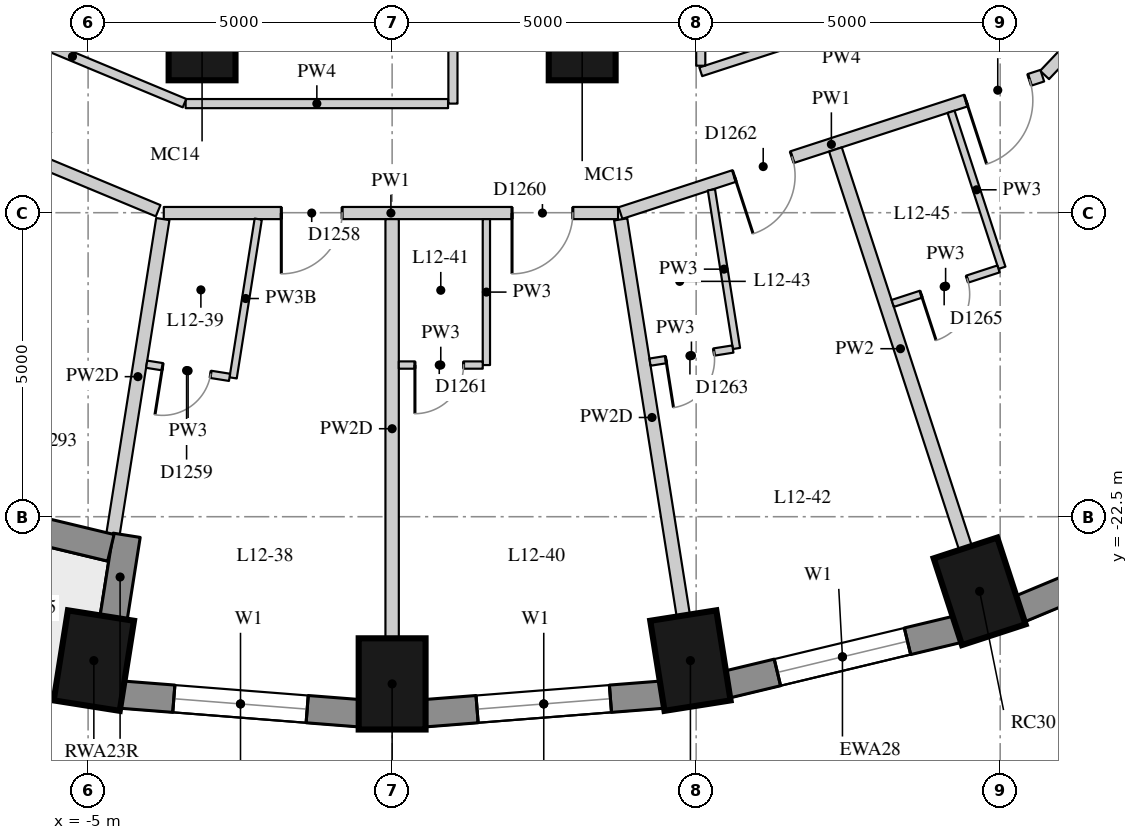
"""IFC4 building model, lengths in metres.
Left out: names, types, materials, properties, quantities, classifications, styles, units other than length and angle.
Written with IfcOpenShell. Run it as: python <this file> out.ifc"""

import sys

from ifc_helpers import new_model, si_unit, direction, frame, frame_2d, origin, origin_2d, place, context, subcontext, project, spatial, rectangle, extrude, element, fill, save


model = new_model("IFC4")
c1 = context("Model", 3, precision=1e-05, world=origin(), true_north=direction((0.0, 1.0)))
c2 = subcontext(c1, "Body", "Model", "MODEL_VIEW")
j1 = project(units=[si_unit("LENGTHUNIT", "METRE"), si_unit("PLANEANGLEUNIT", "RADIAN")], contexts=[c1])
p1 = place(None, origin())
s1 = spatial("IfcSite", under=j1, at=p1, CompositionType="ELEMENT")
p2 = place(p1, origin())
s2 = spatial("IfcBuilding", under=s1, at=p2, CompositionType="ELEMENT")
p3 = place(p2, frame((0.0, 0.0, 48.1)))
s3 = spatial("IfcBuildingStorey", under=s2, at=p3, CompositionType="ELEMENT", Elevation=48.1)
for number, where, z_axis, x_axis in (
    (1, (-4.906, -24.866, 0.0), (0.0, 0.0, 1.0), (-0.156, -0.988, 0.0)),
    (2, (0.0, -25.25, 0.0), (0.0, 0.0, 1.0), (0.0, -1.0, 0.0)),
    (3, (4.906, -24.866, 0.0), (0.0, 0.0, 1.0), (0.156, -0.988, 0.0)),
    (4, (9.662, -23.727, 0.0), (0.0, 0.0, 1.0), (0.31, -0.951, 0.0)),
):
    element("IfcColumn", number, at=place(p3, frame(where, z_axis=z_axis, x_axis=x_axis)), inside=s3, PredefinedType="COLUMN", context=c2, shape_type="SweptSolid", body=[
        extrude(rectangle(XDim=1.5, YDim=1.1, at=origin_2d()), origin(), (0.0, 0.0, 1.0), 3.3),
    ])
for number, where, z_axis, x_axis in (
    (5, (-3.126, -14.772, 0.0), (0.0, 0.0, 1.0), (1.0, 0.0, 0.0)),
    (6, (3.126, -14.772, 0.0), (0.0, 0.0, 1.0), (1.0, 0.0, 0.0)),
):
    element("IfcColumn", number, at=place(p3, frame(where, z_axis=z_axis, x_axis=x_axis)), inside=s3, PredefinedType="COLUMN", context=c2, shape_type="SweptSolid", body=[
        extrude(rectangle(XDim=1.1, YDim=1.1, at=origin_2d()), origin(), (0.0, 0.0, 1.0), 3.3),
    ])
p4 = place(p3, frame((-4.457, -25.426, 0.0), z_axis=(0.0, 0.0, 1.0), x_axis=(0.996955972145, -0.077966592873, 0.0)))
e7 = element("IfcWall", 7, at=p4, inside=s3, PredefinedType="SOLIDWALL", context=c2, shape_type="SweptSolid", body=[
    extrude(rectangle(XDim=3.939, YDim=0.45, at=frame_2d((1.97, 0.0))), origin(), (0.0, 0.0, 1.0), 3.02),
])
p5 = place(p4, frame((0.87, 0.0, 0.4)))
e8 = element("IfcOpeningElement", 8, at=p5, cuts=e7, PredefinedType="OPENING", context=c2, shape_type="SweptSolid", body=[
    extrude(rectangle(XDim=2.2, YDim=1.75, at=frame_2d((1.1, 0.875))), frame((0.0, 0.235, 0.0), z_axis=(0.0, -1.0, 0.0), x_axis=(1.0, 0.0, 0.0)), (0.0, 0.0, 1.0), 0.47),
])
p6 = place(p3, frame((0.53, -25.733, 0.0), z_axis=(0.0, 0.0, 1.0), x_axis=(0.996955972145, 0.077966592873, 0.0)))
e9 = element("IfcWall", 9, at=p6, inside=s3, PredefinedType="SOLIDWALL", context=c2, shape_type="SweptSolid", body=[
    extrude(rectangle(XDim=3.939, YDim=0.45, at=frame_2d((1.97, 0.0))), origin(), (0.0, 0.0, 1.0), 3.02),
])
p7 = place(p6, frame((0.87, 0.0, 0.4)))
e10 = element("IfcOpeningElement", 10, at=p7, cuts=e9, PredefinedType="OPENING", context=c2, shape_type="SweptSolid", body=[
    extrude(rectangle(XDim=2.2, YDim=1.75, at=frame_2d((1.1, 0.875))), frame((0.0, 0.235, 0.0), z_axis=(0.0, -1.0, 0.0), x_axis=(1.0, 0.0, 0.0)), (0.0, 0.0, 1.0), 0.47),
])
p8 = place(p3, frame((5.504, -25.26, 0.0), z_axis=(0.0, 0.0, 1.0), x_axis=(0.972496561493, 0.232917233979, 0.0)))
e11 = element("IfcWall", 11, at=p8, inside=s3, PredefinedType="SOLIDWALL", context=c2, shape_type="SweptSolid", body=[
    extrude(rectangle(XDim=3.911, YDim=0.45, at=frame_2d((1.956, 0.0))), origin(), (0.0, 0.0, 1.0), 3.02),
])
p9 = place(p8, frame((0.855, 0.0, 0.4)))
e12 = element("IfcOpeningElement", 12, at=p9, cuts=e11, PredefinedType="OPENING", context=c2, shape_type="SweptSolid", body=[
    extrude(rectangle(XDim=2.2, YDim=1.75, at=frame_2d((1.1, 0.875))), frame((0.0, 0.235, 0.0), z_axis=(0.0, -1.0, 0.0), x_axis=(1.0, 0.0, 0.0)), (0.0, 0.0, 1.0), 0.47),
])
p10 = place(p3, frame((10.315, -24.021, 0.0), z_axis=(0.0, 0.0, 1.0), x_axis=(0.923031964282, 0.384723267966, 0.0)))
e13 = element("IfcWall", 13, at=p10, inside=s3, PredefinedType="SOLIDWALL", context=c2, shape_type="SweptSolid", body=[
    extrude(rectangle(XDim=3.856, YDim=0.45, at=frame_2d((1.928, 0.0))), origin(), (0.0, 0.0, 1.0), 3.02),
])
p11 = place(p10, frame((0.828, 0.0, 0.4)))
e14 = element("IfcOpeningElement", 14, at=p11, cuts=e13, PredefinedType="OPENING", context=c2, shape_type="SweptSolid", body=[
    extrude(rectangle(XDim=2.2, YDim=1.75, at=frame_2d((1.1, 0.875))), frame((0.0, 0.235, 0.0), z_axis=(0.0, -1.0, 0.0), x_axis=(1.0, 0.0, 0.0)), (0.0, 0.0, 1.0), 0.47),
])
p12 = place(p3, frame((-4.583, -24.178, 0.0), z_axis=(0.0, 0.0, 1.0), x_axis=(0.156133927791, 0.98773589415, 0.0)))
e15 = element("IfcWall", 15, at=p12, inside=s3, PredefinedType="SOLIDWALL", context=c2, shape_type="SweptSolid", body=[
    extrude(rectangle(XDim=1.39, YDim=0.45, at=frame_2d((0.695, 0.0))), origin(), (0.0, 0.0, 1.0), 2.47),
])
p13 = place(p3, frame((-9.122, -21.932, 0.0), z_axis=(0.0, 0.0, 1.0), x_axis=(0.972346547441, -0.233542697764, 0.0)))
e16 = element("IfcWall", 16, at=p13, inside=s3, PredefinedType="SOLIDWALL", context=c2, shape_type="SweptSolid", body=[
    extrude(rectangle(XDim=4.624, YDim=0.45, at=frame_2d((2.312, 0.0))), origin(), (0.0, 0.0, 1.0), 3.02),
])
p14 = place(p13, frame((1.237, 0.0, 0.4)))
e17 = element("IfcOpeningElement", 17, at=p14, cuts=e16, PredefinedType="OPENING", context=c2, shape_type="SweptSolid", body=[
    extrude(rectangle(XDim=1.0, YDim=1.75, at=frame_2d((0.5, 0.875))), frame((0.0, 0.235, 0.0), z_axis=(0.0, -1.0, 0.0), x_axis=(1.0, 0.0, 0.0)), (0.0, 0.0, 1.0), 0.47),
])
p15 = place(p13, frame((2.387, 0.0, 0.0)))
e18 = element("IfcOpeningElement", 18, at=p15, cuts=e16, PredefinedType="OPENING", context=c2, shape_type="SweptSolid", body=[
    extrude(rectangle(XDim=1.0, YDim=2.15, at=frame_2d((0.5, 1.075))), frame((0.0, 0.235, 0.0), z_axis=(0.0, -1.0, 0.0), x_axis=(1.0, 0.0, 0.0)), (0.0, 0.0, 1.0), 0.47),
])
p16 = place(p3, frame((12.034, -13.858, 0.0), z_axis=(0.0, 0.0, 1.0), x_axis=(-0.687458821662, -0.726223359938, 0.0)))
e19 = element("IfcWall", 19, at=p16, inside=s3, PredefinedType="PARTITIONING", context=c2, shape_type="SweptSolid", body=[
    extrude(rectangle(XDim=1.896, YDim=0.2, at=frame_2d((0.948, 0.0))), origin(), (0.0, 0.0, 1.0), 3.02),
])
p17 = place(p3, frame((10.692, -15.247, 0.0), z_axis=(0.0, 0.0, 1.0), x_axis=(-0.950852414815, -0.309644449718, 0.0)))
e20 = element("IfcWall", 20, at=p17, inside=s3, PredefinedType="PARTITIONING", context=c2, shape_type="SweptSolid", body=[
    extrude(rectangle(XDim=7.296, YDim=0.2, at=frame_2d((3.648, 0.0))), origin(), (0.0, 0.0, 1.0), 3.02),
])
p18 = place(p17, frame((4.327, 0.0, 0.0)))
e21 = element("IfcOpeningElement", 21, at=p18, cuts=e20, PredefinedType="OPENING", context=c2, shape_type="SweptSolid", body=[
    extrude(rectangle(XDim=1.0, YDim=2.1, at=frame_2d((0.5, 1.05))), frame((0.0, 0.11, 0.0), z_axis=(0.0, -1.0, 0.0), x_axis=(1.0, 0.0, 0.0)), (0.0, 0.0, 1.0), 0.22),
])
p19 = place(p17, frame((0.22, 0.0, 0.0)))
e22 = element("IfcOpeningElement", 22, at=p19, cuts=e20, PredefinedType="OPENING", context=c2, shape_type="SweptSolid", body=[
    extrude(rectangle(XDim=1.1, YDim=2.1, at=frame_2d((0.55, 1.05))), frame((0.0, 0.11, 0.0), z_axis=(0.0, -1.0, 0.0), x_axis=(1.0, 0.0, 0.0)), (0.0, 0.0, 1.0), 0.22),
])
p20 = place(p3, frame((3.715, -17.506, 0.0), z_axis=(0.0, 0.0, 1.0), x_axis=(-1.0, 0.0, 0.0)))
e23 = element("IfcWall", 23, at=p20, inside=s3, PredefinedType="PARTITIONING", context=c2, shape_type="SweptSolid", body=[
    extrude(rectangle(XDim=7.471, YDim=0.2, at=frame_2d((3.735, 0.0))), origin(), (0.0, 0.0, 1.0), 3.02),
])
p21 = place(p20, frame((4.538, 0.0, 0.0)))
e24 = element("IfcOpeningElement", 24, at=p21, cuts=e23, PredefinedType="OPENING", context=c2, shape_type="SweptSolid", body=[
    extrude(rectangle(XDim=1.0, YDim=2.1, at=frame_2d((0.5, 1.05))), frame((0.0, 0.11, 0.0), z_axis=(0.0, -1.0, 0.0), x_axis=(1.0, 0.0, 0.0)), (0.0, 0.0, 1.0), 0.22),
])
p22 = place(p20, frame((0.743, 0.0, 0.0)))
e25 = element("IfcOpeningElement", 25, at=p22, cuts=e23, PredefinedType="OPENING", context=c2, shape_type="SweptSolid", body=[
    extrude(rectangle(XDim=1.0, YDim=2.1, at=frame_2d((0.5, 1.05))), frame((0.0, 0.11, 0.0), z_axis=(0.0, -1.0, 0.0), x_axis=(1.0, 0.0, 0.0)), (0.0, 0.0, 1.0), 0.22),
])
p23 = place(p3, frame((-3.848, -17.468, 0.0), z_axis=(0.0, 0.0, 1.0), x_axis=(-0.923248226412, 0.384203998454, 0.0)))
e26 = element("IfcWall", 26, at=p23, inside=s3, PredefinedType="PARTITIONING", context=c2, shape_type="SweptSolid", body=[
    extrude(rectangle(XDim=4.341, YDim=0.2, at=frame_2d((2.17, 0.0))), origin(), (0.0, 0.0, 1.0), 3.02),
])
p24 = place(p3, frame((1.0, -9.15, 0.0), z_axis=(0.0, 0.0, 1.0), x_axis=(0.0, -1.0, 0.0)))
e27 = element("IfcWall", 27, at=p24, inside=s3, PredefinedType="PARTITIONING", context=c2, shape_type="SweptSolid", body=[
    extrude(rectangle(XDim=6.556, YDim=0.15, at=frame_2d((3.278, 0.0))), origin(), (0.0, 0.0, 1.0), 2.47),
])
p25 = place(p24, frame((2.828, 0.0, 0.0)))
e28 = element("IfcOpeningElement", 28, at=p25, cuts=e27, PredefinedType="OPENING", context=c2, shape_type="SweptSolid", body=[
    extrude(rectangle(XDim=0.9, YDim=2.1, at=frame_2d((0.45, 1.05))), frame((0.0, 0.085, 0.0), z_axis=(0.0, -1.0, 0.0), x_axis=(1.0, 0.0, 0.0)), (0.0, 0.0, 1.0), 0.17),
])
p26 = place(p3, frame((0.92, -15.706, 0.0), z_axis=(0.0, 0.0, 1.0), x_axis=(-1.0, 0.0, 0.0)))
e29 = element("IfcWall", 29, at=p26, inside=s3, PredefinedType="PARTITIONING", context=c2, shape_type="SweptSolid", body=[
    extrude(rectangle(XDim=4.316, YDim=0.15, at=frame_2d((2.158, 0.0))), origin(), (0.0, 0.0, 1.0), 3.02),
])
p27 = place(p3, frame((-3.415, -15.698, 0.0), z_axis=(0.0, 0.0, 1.0), x_axis=(-0.923293917367, 0.38409418396, 0.0)))
e30 = element("IfcWall", 30, at=p27, inside=s3, PredefinedType="PARTITIONING", context=c2, shape_type="SweptSolid", body=[
    extrude(rectangle(XDim=3.992, YDim=0.15, at=frame_2d((1.996, 0.0))), origin(), (0.0, 0.0, 1.0), 2.57),
])
p28 = place(p3, frame((9.7, -13.677, 0.0), z_axis=(0.0, 0.0, 1.0), x_axis=(-0.950854246358, -0.309638825381, 0.0)))
e31 = element("IfcWall", 31, at=p28, inside=s3, PredefinedType="PARTITIONING", context=c2, shape_type="SweptSolid", body=[
    extrude(rectangle(XDim=4.863, YDim=0.15, at=frame_2d((2.432, 0.0))), origin(), (0.0, 0.0, 1.0), 3.02),
])
p29 = place(p28, frame((1.878, 0.0, 0.0)))
e32 = element("IfcOpeningElement", 32, at=p29, cuts=e31, PredefinedType="OPENING", context=c2, shape_type="SweptSolid", body=[
    extrude(rectangle(XDim=0.9, YDim=2.1, at=frame_2d((0.45, 1.05))), frame((0.0, 0.085, 0.0), z_axis=(0.0, -1.0, 0.0), x_axis=(1.0, 0.0, 0.0)), (0.0, 0.0, 1.0), 0.17),
])
p30 = place(p3, frame((5.076, -15.083, 0.0), z_axis=(0.0, 0.0, 1.0), x_axis=(0.0, 1.0, 0.0)))
e33 = element("IfcWall", 33, at=p30, inside=s3, PredefinedType="PARTITIONING", context=c2, shape_type="SweptSolid", body=[
    extrude(rectangle(XDim=0.86, YDim=0.15, at=frame_2d((0.43, 0.0))), origin(), (0.0, 0.0, 1.0), 3.02),
])
p31 = place(p3, frame((-4.591, -22.789, 0.0), z_axis=(0.0, 0.0, 1.0), x_axis=(0.156110671429, 0.987739570062, 0.0)))
e34 = element("IfcWall", 34, at=p31, inside=s3, PredefinedType="PARTITIONING", context=c2, shape_type="SweptSolid", body=[
    extrude(rectangle(XDim=5.249, YDim=0.22, at=frame_2d((2.624, 0.0))), origin(), (0.0, 0.0, 1.0), 2.47),
])
p32 = place(p3, frame((0.0, -24.5, 0.0), z_axis=(0.0, 0.0, 1.0), x_axis=(0.0, 1.0, 0.0)))
e35 = element("IfcWall", 35, at=p32, inside=s3, PredefinedType="PARTITIONING", context=c2, shape_type="SweptSolid", body=[
    extrude(rectangle(XDim=6.894, YDim=0.22, at=frame_2d((3.447, 0.0))), origin(), (0.0, 0.0, 1.0), 2.47),
])
p33 = place(p3, frame((4.788, -24.125, 0.0), z_axis=(0.0, 0.0, 1.0), x_axis=(-0.156122228938, 0.987737743347, 0.0)))
e36 = element("IfcWall", 36, at=p33, inside=s3, PredefinedType="PARTITIONING", context=c2, shape_type="SweptSolid", body=[
    extrude(rectangle(XDim=6.596, YDim=0.22, at=frame_2d((3.298, 0.0))), origin(), (0.0, 0.0, 1.0), 2.47),
])
p34 = place(p3, frame((9.429, -23.014, 0.0), z_axis=(0.0, 0.0, 1.0), x_axis=(-0.310230029144, 0.950661521793, 0.0)))
e37 = element("IfcWall", 37, at=p34, inside=s3, PredefinedType="PARTITIONING", context=c2, shape_type="SweptSolid", body=[
    extrude(rectangle(XDim=6.895, YDim=0.22, at=frame_2d((3.447, 0.0))), origin(), (0.0, 0.0, 1.0), 3.02),
])
p35 = place(p3, frame((-2.202, -17.606, 0.0), z_axis=(0.0, 0.0, 1.0), x_axis=(-0.156156996107, -0.987732247407, 0.0)))
e38 = element("IfcWall", 38, at=p35, inside=s3, PredefinedType="PARTITIONING", context=c2, shape_type="SweptSolid", body=[
    extrude(rectangle(XDim=2.644, YDim=0.12, at=frame_2d((1.322, 0.0))), origin(), (0.0, 0.0, 1.0), 2.47),
])
p36 = place(p3, frame((1.55, -17.606, 0.0), z_axis=(0.0, 0.0, 1.0), x_axis=(0.0, -1.0, 0.0)))
e39 = element("IfcWall", 39, at=p36, inside=s3, PredefinedType="PARTITIONING", context=c2, shape_type="SweptSolid", body=[
    extrude(rectangle(XDim=2.4, YDim=0.12, at=frame_2d((1.2, 0.0))), origin(), (0.0, 0.0, 1.0), 3.02),
])
p37 = place(p3, frame((5.251, -17.124, 0.0), z_axis=(0.0, 0.0, 1.0), x_axis=(0.156104955519, -0.987740473435, 0.0)))
e40 = element("IfcWall", 40, at=p37, inside=s3, PredefinedType="PARTITIONING", context=c2, shape_type="SweptSolid", body=[
    extrude(rectangle(XDim=2.642, YDim=0.12, at=frame_2d((1.321, 0.0))), origin(), (0.0, 0.0, 1.0), 3.02),
])
p38 = place(p3, frame((9.192, -15.84, 0.0), z_axis=(0.0, 0.0, 1.0), x_axis=(0.310278328391, -0.950645758909, 0.0)))
e41 = element("IfcWall", 41, at=p38, inside=s3, PredefinedType="PARTITIONING", context=c2, shape_type="SweptSolid", body=[
    extrude(rectangle(XDim=2.699, YDim=0.12, at=frame_2d((1.35, 0.0))), origin(), (0.0, 0.0, 1.0), 3.02),
])
p39 = place(p3, frame((-2.674, -20.208, 0.0), z_axis=(0.0, 0.0, 1.0), x_axis=(-0.987695455518, 0.156389536571, 0.0)))
e42 = element("IfcWall", 42, at=p39, inside=s3, PredefinedType="PARTITIONING", context=c2, shape_type="SweptSolid", body=[
    extrude(rectangle(XDim=1.38, YDim=0.12, at=frame_2d((0.69, 0.0))), origin(), (0.0, 0.0, 1.0), 3.02),
])
p40 = place(p39, frame((0.315, 0.0, 0.0)))
e43 = element("IfcOpeningElement", 43, at=p40, cuts=e42, PredefinedType="OPENING", context=c2, shape_type="SweptSolid", body=[
    extrude(rectangle(XDim=0.8, YDim=2.1, at=frame_2d((0.4, 1.05))), frame((0.0, 0.07, 0.0), z_axis=(0.0, -1.0, 0.0), x_axis=(1.0, 0.0, 0.0)), (0.0, 0.0, 1.0), 0.14),
])
p41 = place(p3, frame((1.49, -20.006, 0.0), z_axis=(0.0, 0.0, 1.0), x_axis=(-1.0, 0.0, 0.0)))
e44 = element("IfcWall", 44, at=p41, inside=s3, PredefinedType="PARTITIONING", context=c2, shape_type="SweptSolid", body=[
    extrude(rectangle(XDim=1.38, YDim=0.12, at=frame_2d((0.69, 0.0))), origin(), (0.0, 0.0, 1.0), 3.02),
])
p42 = place(p41, frame((0.315, 0.0, 0.0)))
e45 = element("IfcOpeningElement", 45, at=p42, cuts=e44, PredefinedType="OPENING", context=c2, shape_type="SweptSolid", body=[
    extrude(rectangle(XDim=0.8, YDim=2.1, at=frame_2d((0.4, 1.05))), frame((0.0, 0.07, 0.0), z_axis=(0.0, -1.0, 0.0), x_axis=(1.0, 0.0, 0.0)), (0.0, 0.0, 1.0), 0.14),
])
p43 = place(p3, frame((5.604, -19.742, 0.0), z_axis=(0.0, 0.0, 1.0), x_axis=(-0.987722767831, -0.156216945011, 0.0)))
e46 = element("IfcWall", 46, at=p43, inside=s3, PredefinedType="PARTITIONING", context=c2, shape_type="SweptSolid", body=[
    extrude(rectangle(XDim=1.38, YDim=0.12, at=frame_2d((0.69, 0.0))), origin(), (0.0, 0.0, 1.0), 3.02),
])
p44 = place(p43, frame((0.315, 0.0, 0.0)))
e47 = element("IfcOpeningElement", 47, at=p44, cuts=e46, PredefinedType="OPENING", context=c2, shape_type="SweptSolid", body=[
    extrude(rectangle(XDim=0.8, YDim=2.1, at=frame_2d((0.4, 1.05))), frame((0.0, 0.07, 0.0), z_axis=(0.0, -1.0, 0.0), x_axis=(1.0, 0.0, 0.0)), (0.0, 0.0, 1.0), 0.14),
])
p45 = place(p3, frame((9.972, -18.425, 0.0), z_axis=(0.0, 0.0, 1.0), x_axis=(-0.950678536911, -0.31017788357, 0.0)))
e48 = element("IfcWall", 48, at=p45, inside=s3, PredefinedType="PARTITIONING", context=c2, shape_type="SweptSolid", body=[
    extrude(rectangle(XDim=1.83, YDim=0.12, at=frame_2d((0.915, 0.0))), origin(), (0.0, 0.0, 1.0), 3.02),
])
p46 = place(p45, frame((0.54, 0.0, 0.0)))
e49 = element("IfcOpeningElement", 49, at=p46, cuts=e48, PredefinedType="OPENING", context=c2, shape_type="SweptSolid", body=[
    extrude(rectangle(XDim=0.8, YDim=2.1, at=frame_2d((0.4, 1.05))), frame((0.0, 0.07, 0.0), z_axis=(0.0, -1.0, 0.0), x_axis=(1.0, 0.0, 0.0)), (0.0, 0.0, 1.0), 0.14),
])
p47 = place(p5, origin())
e50 = element("IfcWindow", 50, at=p47, inside=s3, PartitioningType="SINGLE_PANEL", PredefinedType="WINDOW", context=c2, shape_type="SweptSolid", body=[
    extrude(rectangle(XDim=2.2, YDim=1.75, at=frame_2d((1.1, 0.875))), frame((0.0, 0.035, 0.0), z_axis=(0.0, -1.0, 0.0), x_axis=(1.0, 0.0, 0.0)), (0.0, 0.0, 1.0), 0.06),
])
fill(e8, e50)
p48 = place(p7, origin())
e51 = element("IfcWindow", 51, at=p48, inside=s3, PartitioningType="SINGLE_PANEL", PredefinedType="WINDOW", context=c2, shape_type="SweptSolid", body=[
    extrude(rectangle(XDim=2.2, YDim=1.75, at=frame_2d((1.1, 0.875))), frame((0.0, 0.035, 0.0), z_axis=(0.0, -1.0, 0.0), x_axis=(1.0, 0.0, 0.0)), (0.0, 0.0, 1.0), 0.06),
])
fill(e10, e51)
p49 = place(p9, origin())
e52 = element("IfcWindow", 52, at=p49, inside=s3, PartitioningType="SINGLE_PANEL", PredefinedType="WINDOW", context=c2, shape_type="SweptSolid", body=[
    extrude(rectangle(XDim=2.2, YDim=1.75, at=frame_2d((1.1, 0.875))), frame((0.0, 0.035, 0.0), z_axis=(0.0, -1.0, 0.0), x_axis=(1.0, 0.0, 0.0)), (0.0, 0.0, 1.0), 0.06),
])
fill(e12, e52)
p50 = place(p21, origin())
e53 = element("IfcDoor", 53, at=p50, inside=s3, OperationType="SINGLE_SWING_RIGHT", PredefinedType="DOOR", context=c2, shape_type="SweptSolid", body=[
    extrude(rectangle(XDim=1.0, YDim=2.1, at=frame_2d((0.5, 1.05))), frame((0.0, 0.025, 0.0), z_axis=(0.0, -1.0, 0.0), x_axis=(1.0, 0.0, 0.0)), (0.0, 0.0, 1.0), 0.05),
])
fill(e24, e53)
p51 = place(p40, origin())
e54 = element("IfcDoor", 54, at=p51, inside=s3, OperationType="SINGLE_SWING_RIGHT", PredefinedType="DOOR", context=c2, shape_type="SweptSolid", body=[
    extrude(rectangle(XDim=0.8, YDim=2.1, at=frame_2d((0.4, 1.05))), frame((0.0, 0.025, 0.0), z_axis=(0.0, -1.0, 0.0), x_axis=(1.0, 0.0, 0.0)), (0.0, 0.0, 1.0), 0.05),
])
fill(e43, e54)
p52 = place(p22, origin())
e55 = element("IfcDoor", 55, at=p52, inside=s3, OperationType="SINGLE_SWING_RIGHT", PredefinedType="DOOR", context=c2, shape_type="SweptSolid", body=[
    extrude(rectangle(XDim=1.0, YDim=2.1, at=frame_2d((0.5, 1.05))), frame((0.0, 0.025, 0.0), z_axis=(0.0, -1.0, 0.0), x_axis=(1.0, 0.0, 0.0)), (0.0, 0.0, 1.0), 0.05),
])
fill(e25, e55)
p53 = place(p42, origin())
e56 = element("IfcDoor", 56, at=p53, inside=s3, OperationType="SINGLE_SWING_RIGHT", PredefinedType="DOOR", context=c2, shape_type="SweptSolid", body=[
    extrude(rectangle(XDim=0.8, YDim=2.1, at=frame_2d((0.4, 1.05))), frame((0.0, 0.025, 0.0), z_axis=(0.0, -1.0, 0.0), x_axis=(1.0, 0.0, 0.0)), (0.0, 0.0, 1.0), 0.05),
])
fill(e45, e56)
p54 = place(p18, origin())
e57 = element("IfcDoor", 57, at=p54, inside=s3, OperationType="SINGLE_SWING_RIGHT", PredefinedType="DOOR", context=c2, shape_type="SweptSolid", body=[
    extrude(rectangle(XDim=1.0, YDim=2.1, at=frame_2d((0.5, 1.05))), frame((0.0, 0.025, 0.0), z_axis=(0.0, -1.0, 0.0), x_axis=(1.0, 0.0, 0.0)), (0.0, 0.0, 1.0), 0.05),
])
fill(e21, e57)
p55 = place(p44, origin())
e58 = element("IfcDoor", 58, at=p55, inside=s3, OperationType="SINGLE_SWING_RIGHT", PredefinedType="DOOR", context=c2, shape_type="SweptSolid", body=[
    extrude(rectangle(XDim=0.8, YDim=2.1, at=frame_2d((0.4, 1.05))), frame((0.0, 0.025, 0.0), z_axis=(0.0, -1.0, 0.0), x_axis=(1.0, 0.0, 0.0)), (0.0, 0.0, 1.0), 0.05),
])
fill(e47, e58)
p56 = place(p19, origin())
e59 = element("IfcDoor", 59, at=p56, inside=s3, OperationType="SINGLE_SWING_RIGHT", PredefinedType="DOOR", context=c2, shape_type="SweptSolid", body=[
    extrude(rectangle(XDim=1.1, YDim=2.1, at=frame_2d((0.55, 1.05))), frame((0.0, 0.025, 0.0), z_axis=(0.0, -1.0, 0.0), x_axis=(1.0, 0.0, 0.0)), (0.0, 0.0, 1.0), 0.05),
])
fill(e22, e59)
p57 = place(p46, origin())
e60 = element("IfcDoor", 60, at=p57, inside=s3, OperationType="SINGLE_SWING_RIGHT", PredefinedType="DOOR", context=c2, shape_type="SweptSolid", body=[
    extrude(rectangle(XDim=0.8, YDim=2.1, at=frame_2d((0.4, 1.05))), frame((0.0, 0.025, 0.0), z_axis=(0.0, -1.0, 0.0), x_axis=(1.0, 0.0, 0.0)), (0.0, 0.0, 1.0), 0.05),
])
fill(e49, e60)
save(model, sys.argv[1])
